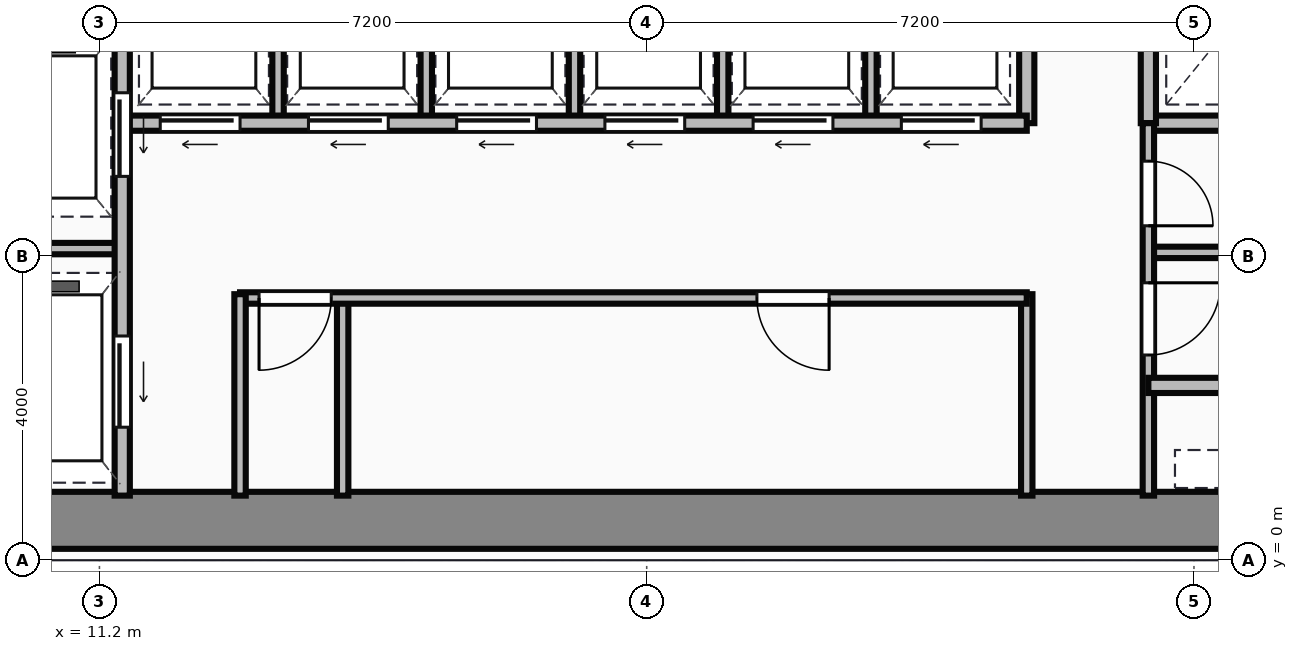
"""IFC4 building model, lengths in metres.
Left out: names, types, materials, properties, quantities, classifications, styles, units other than length and angle.
Written with IfcOpenShell. Run it as: python <this file> out.ifc"""

import sys

from ifc_helpers import new_model, si_unit, direction, frame, frame_2d, origin, place, context, subcontext, project, spatial, rectangle, extrude, source, transform, mapped, element, fill, save


model = new_model("IFC4")
c1 = context("Model", 3, precision=1e-05, world=origin(), true_north=direction((0.0, 1.0)))
c2 = subcontext(c1, "Body", "Model", "MODEL_VIEW")
j1 = project(units=[si_unit("LENGTHUNIT", "METRE"), si_unit("PLANEANGLEUNIT", "RADIAN")], contexts=[c1])
p1 = place(None, origin())
s1 = spatial("IfcSite", under=j1, at=p1, CompositionType="ELEMENT")
p2 = place(p1, origin())
s2 = spatial("IfcBuilding", under=s1, at=p2, CompositionType="ELEMENT")
p3 = place(p2, frame((0.0, 0.0, 132.45)))
s3 = spatial("IfcBuildingStorey", under=s2, at=p3, CompositionType="ELEMENT", Elevation=132.45)
m1 = source(origin(), c2, "Body", "SweptSolid", [
    extrude(rectangle(XDim=29.5, YDim=0.75, at=frame_2d((14.75, 0.0))), origin(), (0.0, 0.0, 1.0), 3.65),
])
p4 = place(p3, frame((4.5, 0.525, 0.0), z_axis=(0.0, 0.0, 1.0), x_axis=(1.0, 0.0, 0.0)))
e1 = element("IfcWall", 1, at=p4, inside=s3, PredefinedType="SHEAR", context=c2, shape_type="MappedRepresentation", body=[
    mapped(m1, transform((0.0, 0.0, 0.0))),
])
m2 = source(origin(), c2, "Body", "SweptSolid", [
    extrude(rectangle(XDim=9.6, YDim=0.2, at=frame_2d((4.8, 0.0))), origin(), (0.0, 0.0, 1.0), 3.35),
])
p5 = place(p3, frame((11.5, 0.85, 0.0), z_axis=(0.0, 0.0, 1.0), x_axis=(0.0, 1.0, 0.0)))
e2 = element("IfcWall", 2, at=p5, inside=s3, PredefinedType="PARTITIONING", context=c2, shape_type="MappedRepresentation", body=[
    mapped(m2, transform((0.0, 0.0, 0.0))),
])
p6 = place(p5, frame((4.2, 0.0, 0.0)))
e3 = element("IfcOpeningElement", 3, at=p6, cuts=e2, PredefinedType="OPENING", context=c2, shape_type="SweptSolid", body=[
    extrude(rectangle(XDim=1.1, YDim=2.15, at=frame_2d((0.55, 1.075))), frame((0.0, 0.11, 0.0), z_axis=(0.0, -1.0, 0.0), x_axis=(1.0, 0.0, 0.0)), (0.0, 0.0, 1.0), 0.22),
])
p7 = place(p5, frame((0.9, 0.0, 0.0)))
e4 = element("IfcOpeningElement", 4, at=p7, cuts=e2, PredefinedType="OPENING", context=c2, shape_type="SweptSolid", body=[
    extrude(rectangle(XDim=1.2, YDim=2.15, at=frame_2d((0.6, 1.075))), frame((0.0, 0.11, 0.0), z_axis=(0.0, -1.0, 0.0), x_axis=(1.0, 0.0, 0.0)), (0.0, 0.0, 1.0), 0.22),
])
m3 = source(origin(), c2, "Body", "SweptSolid", [
    extrude(rectangle(XDim=2.4, YDim=0.15, at=frame_2d((1.2, 0.0))), origin(), (0.0, 0.0, 1.0), 3.35),
])
p8 = place(p3, frame((9.1, 4.1, 0.0), z_axis=(0.0, 0.0, 1.0), x_axis=(1.0, 0.0, 0.0)))
e5 = element("IfcWall", 5, at=p8, inside=s3, PredefinedType="PARTITIONING", context=c2, shape_type="MappedRepresentation", body=[
    mapped(m3, transform((0.0, 0.0, 0.0))),
])
m4 = source(origin(), c2, "Body", "SweptSolid", [
    extrude(rectangle(XDim=2.65, YDim=0.15, at=frame_2d((1.325, 0.0))), origin(), (0.0, 0.0, 1.0), 3.35),
])
p9 = place(p3, frame((13.05, 0.85, 0.0), z_axis=(0.0, 0.0, 1.0), x_axis=(0.0, 1.0, 0.0)))
e6 = element("IfcWall", 6, at=p9, inside=s3, PredefinedType="PARTITIONING", context=c2, shape_type="MappedRepresentation", body=[
    mapped(m4, transform((0.0, 0.0, 0.0))),
])
m5 = source(origin(), c2, "Body", "SweptSolid", [
    extrude(rectangle(XDim=10.35, YDim=0.15, at=frame_2d((5.175, 0.0))), origin(), (0.0, 0.0, 1.0), 3.35),
])
p10 = place(p3, frame((13.05, 3.45, 0.0), z_axis=(0.0, 0.0, 1.0), x_axis=(1.0, 0.0, 0.0)))
e7 = element("IfcWall", 7, at=p10, inside=s3, PredefinedType="PARTITIONING", context=c2, shape_type="MappedRepresentation", body=[
    mapped(m5, transform((0.0, 0.0, 0.0))),
])
p11 = place(p10, frame((0.25, 0.0, 0.0)))
e8 = element("IfcOpeningElement", 8, at=p11, cuts=e7, PredefinedType="OPENING", context=c2, shape_type="SweptSolid", body=[
    extrude(rectangle(XDim=0.95, YDim=2.15, at=frame_2d((0.475, 1.075))), frame((0.0, 0.085, 0.0), z_axis=(0.0, -1.0, 0.0), x_axis=(1.0, 0.0, 0.0)), (0.0, 0.0, 1.0), 0.17),
])
p12 = place(p10, frame((6.8, 0.0, 0.0)))
e9 = element("IfcOpeningElement", 9, at=p12, cuts=e7, PredefinedType="OPENING", context=c2, shape_type="SweptSolid", body=[
    extrude(rectangle(XDim=0.95, YDim=2.15, at=frame_2d((0.475, 1.075))), frame((0.0, 0.085, 0.0), z_axis=(0.0, -1.0, 0.0), x_axis=(1.0, 0.0, 0.0)), (0.0, 0.0, 1.0), 0.17),
])
p13 = place(p3, frame((23.4, 0.85, 0.0), z_axis=(0.0, 0.0, 1.0), x_axis=(0.0, 1.0, 0.0)))
e10 = element("IfcWall", 10, at=p13, inside=s3, PredefinedType="PARTITIONING", context=c2, shape_type="MappedRepresentation", body=[
    mapped(m4, transform((0.0, 0.0, 0.0))),
])
m6 = source(origin(), c2, "Body", "SweptSolid", [
    extrude(rectangle(XDim=2.6, YDim=0.15, at=frame_2d((1.3, 0.0))), origin(), (0.0, 0.0, 1.0), 3.35),
])
p14 = place(p3, frame((14.4, 0.85, 0.0), z_axis=(0.0, 0.0, 1.0), x_axis=(0.0, 1.0, 0.0)))
e11 = element("IfcWall", 11, at=p14, inside=s3, PredefinedType="PARTITIONING", context=c2, shape_type="MappedRepresentation", body=[
    mapped(m6, transform((0.0, 0.0, 0.0))),
])
m7 = source(origin(), c2, "Body", "SweptSolid", [
    extrude(rectangle(XDim=11.85, YDim=0.2, at=frame_2d((5.925, 0.0))), origin(), (0.0, 0.0, 1.0), 3.35),
])
p15 = place(p3, frame((11.55, 5.75, 0.0), z_axis=(0.0, 0.0, 1.0), x_axis=(1.0, 0.0, 0.0)))
e12 = element("IfcWall", 12, at=p15, inside=s3, PredefinedType="PARTITIONING", context=c2, shape_type="MappedRepresentation", body=[
    mapped(m7, transform((0.0, 0.0, 0.0))),
])
p16 = place(p15, frame((0.45, 0.0, 0.0)))
e13 = element("IfcOpeningElement", 13, at=p16, cuts=e12, PredefinedType="OPENING", context=c2, shape_type="SweptSolid", body=[
    extrude(rectangle(XDim=1.05, YDim=2.15, at=frame_2d((0.525, 1.075))), frame((0.0, 0.11, 0.0), z_axis=(0.0, -1.0, 0.0), x_axis=(1.0, 0.0, 0.0)), (0.0, 0.0, 1.0), 0.22),
])
p17 = place(p15, frame((2.4, 0.0, 0.0)))
e14 = element("IfcOpeningElement", 14, at=p17, cuts=e12, PredefinedType="OPENING", context=c2, shape_type="SweptSolid", body=[
    extrude(rectangle(XDim=1.05, YDim=2.15, at=frame_2d((0.525, 1.075))), frame((0.0, 0.11, 0.0), z_axis=(0.0, -1.0, 0.0), x_axis=(1.0, 0.0, 0.0)), (0.0, 0.0, 1.0), 0.22),
])
p18 = place(p15, frame((4.35, 0.0, 0.0)))
e15 = element("IfcOpeningElement", 15, at=p18, cuts=e12, PredefinedType="OPENING", context=c2, shape_type="SweptSolid", body=[
    extrude(rectangle(XDim=1.05, YDim=2.15, at=frame_2d((0.525, 1.075))), frame((0.0, 0.11, 0.0), z_axis=(0.0, -1.0, 0.0), x_axis=(1.0, 0.0, 0.0)), (0.0, 0.0, 1.0), 0.22),
])
p19 = place(p15, frame((6.3, 0.0, 0.0)))
e16 = element("IfcOpeningElement", 16, at=p19, cuts=e12, PredefinedType="OPENING", context=c2, shape_type="SweptSolid", body=[
    extrude(rectangle(XDim=1.05, YDim=2.15, at=frame_2d((0.525, 1.075))), frame((0.0, 0.11, 0.0), z_axis=(0.0, -1.0, 0.0), x_axis=(1.0, 0.0, 0.0)), (0.0, 0.0, 1.0), 0.22),
])
p20 = place(p15, frame((8.25, 0.0, 0.0)))
e17 = element("IfcOpeningElement", 17, at=p20, cuts=e12, PredefinedType="OPENING", context=c2, shape_type="SweptSolid", body=[
    extrude(rectangle(XDim=1.05, YDim=2.15, at=frame_2d((0.525, 1.075))), frame((0.0, 0.11, 0.0), z_axis=(0.0, -1.0, 0.0), x_axis=(1.0, 0.0, 0.0)), (0.0, 0.0, 1.0), 0.22),
])
p21 = place(p15, frame((10.2, 0.0, 0.0)))
e18 = element("IfcOpeningElement", 18, at=p21, cuts=e12, PredefinedType="OPENING", context=c2, shape_type="SweptSolid", body=[
    extrude(rectangle(XDim=1.05, YDim=2.15, at=frame_2d((0.525, 1.075))), frame((0.0, 0.11, 0.0), z_axis=(0.0, -1.0, 0.0), x_axis=(1.0, 0.0, 0.0)), (0.0, 0.0, 1.0), 0.22),
])
m8 = source(origin(), c2, "Body", "SweptSolid", [
    extrude(rectangle(XDim=2.6, YDim=0.2, at=frame_2d((1.3, 0.0))), origin(), (0.0, 0.0, 1.0), 3.35),
])
p22 = place(p3, frame((23.4, 5.75, 0.0), z_axis=(0.0, 0.0, 1.0), x_axis=(0.0, 1.0, 0.0)))
e19 = element("IfcWall", 19, at=p22, inside=s3, PredefinedType="PARTITIONING", context=c2, shape_type="MappedRepresentation", body=[
    mapped(m8, transform((0.0, 0.0, 0.0))),
])
m9 = source(origin(), c2, "Body", "SweptSolid", [
    extrude(rectangle(XDim=2.5, YDim=0.15, at=frame_2d((1.25, 0.0))), origin(), (0.0, 0.0, 1.0), 3.35),
])
for number, where, z_axis, x_axis in (
    (20, (13.55, 5.8, 0.0), (0.0, 0.0, 1.0), (0.0, 1.0, 0.0)),
    (21, (15.5, 5.8, 0.0), (0.0, 0.0, 1.0), (0.0, 1.0, 0.0)),
    (22, (17.45, 5.8, 0.0), (0.0, 0.0, 1.0), (0.0, 1.0, 0.0)),
    (23, (19.4, 5.8, 0.0), (0.0, 0.0, 1.0), (0.0, 1.0, 0.0)),
    (24, (21.35, 5.8, 0.0), (0.0, 0.0, 1.0), (0.0, 1.0, 0.0)),
):
    element("IfcWall", number, at=place(p3, frame(where, z_axis=z_axis, x_axis=x_axis)), inside=s3, PredefinedType="PARTITIONING", context=c2, shape_type="MappedRepresentation", body=[
        mapped(m9, transform((0.0, 0.0, 0.0))),
    ])
m10 = source(origin(), c2, "Body", "SweptSolid", [
    extrude(rectangle(XDim=4.55, YDim=0.2, at=frame_2d((2.275, 0.0))), origin(), (0.0, 0.0, 1.0), 3.35),
])
p23 = place(p3, frame((25.0, 5.75, 0.0), z_axis=(0.0, 0.0, 1.0), x_axis=(1.0, 0.0, 0.0)))
e25 = element("IfcWall", 25, at=p23, inside=s3, PredefinedType="PARTITIONING", context=c2, shape_type="MappedRepresentation", body=[
    mapped(m10, transform((0.0, 0.0, 0.0))),
])
p24 = place(p3, frame((25.0, 5.75, 0.0), z_axis=(0.0, 0.0, 1.0), x_axis=(0.0, 1.0, 0.0)))
e26 = element("IfcWall", 26, at=p24, inside=s3, PredefinedType="PARTITIONING", context=c2, shape_type="MappedRepresentation", body=[
    mapped(m8, transform((0.0, 0.0, 0.0))),
])
m11 = source(origin(), c2, "Body", "SweptSolid", [
    extrude(rectangle(XDim=4.9, YDim=0.15, at=frame_2d((2.45, 0.0))), origin(), (0.0, 0.0, 1.0), 3.35),
])
p25 = place(p3, frame((25.0, 0.85, 0.0), z_axis=(0.0, 0.0, 1.0), x_axis=(0.0, 1.0, 0.0)))
e27 = element("IfcWall", 27, at=p25, inside=s3, PredefinedType="PARTITIONING", context=c2, shape_type="MappedRepresentation", body=[
    mapped(m11, transform((0.0, 0.0, 0.0))),
])
p26 = place(p25, frame((1.85, 0.0, 0.0)))
e28 = element("IfcOpeningElement", 28, at=p26, cuts=e27, PredefinedType="OPENING", context=c2, shape_type="SweptSolid", body=[
    extrude(rectangle(XDim=0.95, YDim=2.15, at=frame_2d((0.475, 1.075))), frame((0.0, 0.085, 0.0), z_axis=(0.0, -1.0, 0.0), x_axis=(1.0, 0.0, 0.0)), (0.0, 0.0, 1.0), 0.17),
])
p27 = place(p25, frame((3.55, 0.0, 0.0)))
e29 = element("IfcOpeningElement", 29, at=p27, cuts=e27, PredefinedType="OPENING", context=c2, shape_type="SweptSolid", body=[
    extrude(rectangle(XDim=0.85, YDim=2.15, at=frame_2d((0.425, 1.075))), frame((0.0, 0.085, 0.0), z_axis=(0.0, -1.0, 0.0), x_axis=(1.0, 0.0, 0.0)), (0.0, 0.0, 1.0), 0.17),
])
m12 = source(origin(), c2, "Body", "SweptSolid", [
    extrude(rectangle(XDim=2.4, YDim=0.2, at=frame_2d((1.2, 0.0))), origin(), (0.0, 0.0, 1.0), 3.35),
])
p28 = place(p3, frame((25.0, 2.3, 0.0), z_axis=(0.0, 0.0, 1.0), x_axis=(1.0, 0.0, 0.0)))
e30 = element("IfcWall", 30, at=p28, inside=s3, PredefinedType="PARTITIONING", context=c2, shape_type="MappedRepresentation", body=[
    mapped(m12, transform((0.0, 0.0, 0.0))),
])
m13 = source(origin(), c2, "Body", "SweptSolid", [
    extrude(rectangle(XDim=4.55, YDim=0.15, at=frame_2d((2.275, 0.0))), origin(), (0.0, 0.0, 1.0), 3.35),
])
p29 = place(p3, frame((25.0, 4.05, 0.0), z_axis=(0.0, 0.0, 1.0), x_axis=(1.0, 0.0, 0.0)))
e31 = element("IfcWall", 31, at=p29, inside=s3, PredefinedType="PARTITIONING", context=c2, shape_type="MappedRepresentation", body=[
    mapped(m13, transform((0.0, 0.0, 0.0))),
])
m14 = source(origin(), c2, "Body", "SweptSolid", [
    extrude(rectangle(XDim=1.1, YDim=2.15, at=frame_2d((0.55, 1.075))), frame((0.0, 0.025, 0.0), z_axis=(0.0, -1.0, 0.0), x_axis=(1.0, 0.0, 0.0)), (0.0, 0.0, 1.0), 0.05),
])
p30 = place(p6, frame((1.1, 0.0, 0.0), z_axis=(0.0, 0.0, 1.0), x_axis=(-1.0, 0.0, 0.0)))
e32 = element("IfcDoor", 32, at=p30, inside=s3, OperationType="SLIDING_TO_LEFT", PredefinedType="DOOR", context=c2, shape_type="MappedRepresentation", body=[
    mapped(m14, transform((0.0, 0.0, 0.0))),
])
fill(e3, e32)
m15 = source(origin(), c2, "Body", "SweptSolid", [
    extrude(rectangle(XDim=1.2, YDim=2.15, at=frame_2d((0.6, 1.075))), frame((0.0, 0.025, 0.0), z_axis=(0.0, -1.0, 0.0), x_axis=(1.0, 0.0, 0.0)), (0.0, 0.0, 1.0), 0.05),
])
p31 = place(p7, frame((1.2, 0.0, 0.0), z_axis=(0.0, 0.0, 1.0), x_axis=(-1.0, 0.0, 0.0)))
e33 = element("IfcDoor", 33, at=p31, inside=s3, OperationType="SLIDING_TO_LEFT", PredefinedType="DOOR", context=c2, shape_type="MappedRepresentation", body=[
    mapped(m15, transform((0.0, 0.0, 0.0))),
])
fill(e4, e33)
m16 = source(origin(), c2, "Body", "SweptSolid", [
    extrude(rectangle(XDim=0.95, YDim=2.15, at=frame_2d((0.475, 1.075))), frame((0.0, 0.025, 0.0), z_axis=(0.0, -1.0, 0.0), x_axis=(1.0, 0.0, 0.0)), (0.0, 0.0, 1.0), 0.05),
])
p32 = place(p11, origin())
e34 = element("IfcDoor", 34, at=p32, inside=s3, OperationType="SINGLE_SWING_LEFT", PredefinedType="DOOR", context=c2, shape_type="MappedRepresentation", body=[
    mapped(m16, transform((0.0, 0.0, 0.0))),
])
fill(e8, e34)
p33 = place(p12, origin())
e35 = element("IfcDoor", 35, at=p33, inside=s3, OperationType="SINGLE_SWING_RIGHT", PredefinedType="DOOR", context=c2, shape_type="MappedRepresentation", body=[
    mapped(m16, transform((0.0, 0.0, 0.0))),
])
fill(e9, e35)
m17 = source(origin(), c2, "Body", "SweptSolid", [
    extrude(rectangle(XDim=1.05, YDim=2.15, at=frame_2d((0.525, 1.075))), frame((0.0, 0.025, 0.0), z_axis=(0.0, -1.0, 0.0), x_axis=(1.0, 0.0, 0.0)), (0.0, 0.0, 1.0), 0.05),
])
p34 = place(p16, frame((1.05, 0.0, 0.0), z_axis=(0.0, 0.0, 1.0), x_axis=(-1.0, 0.0, 0.0)))
e36 = element("IfcDoor", 36, at=p34, inside=s3, OperationType="SLIDING_TO_LEFT", PredefinedType="DOOR", context=c2, shape_type="MappedRepresentation", body=[
    mapped(m17, transform((0.0, 0.0, 0.0))),
])
fill(e13, e36)
p35 = place(p17, frame((1.05, 0.0, 0.0), z_axis=(0.0, 0.0, 1.0), x_axis=(-1.0, 0.0, 0.0)))
e37 = element("IfcDoor", 37, at=p35, inside=s3, OperationType="SLIDING_TO_LEFT", PredefinedType="DOOR", context=c2, shape_type="MappedRepresentation", body=[
    mapped(m17, transform((0.0, 0.0, 0.0))),
])
fill(e14, e37)
p36 = place(p18, frame((1.05, 0.0, 0.0), z_axis=(0.0, 0.0, 1.0), x_axis=(-1.0, 0.0, 0.0)))
e38 = element("IfcDoor", 38, at=p36, inside=s3, OperationType="SLIDING_TO_LEFT", PredefinedType="DOOR", context=c2, shape_type="MappedRepresentation", body=[
    mapped(m17, transform((0.0, 0.0, 0.0))),
])
fill(e15, e38)
p37 = place(p19, frame((1.05, 0.0, 0.0), z_axis=(0.0, 0.0, 1.0), x_axis=(-1.0, 0.0, 0.0)))
e39 = element("IfcDoor", 39, at=p37, inside=s3, OperationType="SLIDING_TO_LEFT", PredefinedType="DOOR", context=c2, shape_type="MappedRepresentation", body=[
    mapped(m17, transform((0.0, 0.0, 0.0))),
])
fill(e16, e39)
p38 = place(p20, frame((1.05, 0.0, 0.0), z_axis=(0.0, 0.0, 1.0), x_axis=(-1.0, 0.0, 0.0)))
e40 = element("IfcDoor", 40, at=p38, inside=s3, OperationType="SLIDING_TO_LEFT", PredefinedType="DOOR", context=c2, shape_type="MappedRepresentation", body=[
    mapped(m17, transform((0.0, 0.0, 0.0))),
])
fill(e17, e40)
p39 = place(p21, frame((1.05, 0.0, 0.0), z_axis=(0.0, 0.0, 1.0), x_axis=(-1.0, 0.0, 0.0)))
e41 = element("IfcDoor", 41, at=p39, inside=s3, OperationType="SLIDING_TO_LEFT", PredefinedType="DOOR", context=c2, shape_type="MappedRepresentation", body=[
    mapped(m17, transform((0.0, 0.0, 0.0))),
])
fill(e18, e41)
p40 = place(p26, origin())
e42 = element("IfcDoor", 42, at=p40, inside=s3, OperationType="SINGLE_SWING_RIGHT", PredefinedType="DOOR", context=c2, shape_type="MappedRepresentation", body=[
    mapped(m16, transform((0.0, 0.0, 0.0))),
])
fill(e28, e42)
m18 = source(origin(), c2, "Body", "SweptSolid", [
    extrude(rectangle(XDim=0.85, YDim=2.15, at=frame_2d((0.425, 1.075))), frame((0.0, 0.025, 0.0), z_axis=(0.0, -1.0, 0.0), x_axis=(1.0, 0.0, 0.0)), (0.0, 0.0, 1.0), 0.05),
])
p41 = place(p27, origin())
e43 = element("IfcDoor", 43, at=p41, inside=s3, OperationType="SINGLE_SWING_LEFT", PredefinedType="DOOR", context=c2, shape_type="MappedRepresentation", body=[
    mapped(m18, transform((0.0, 0.0, 0.0))),
])
fill(e29, e43)
save(model, sys.argv[1])
